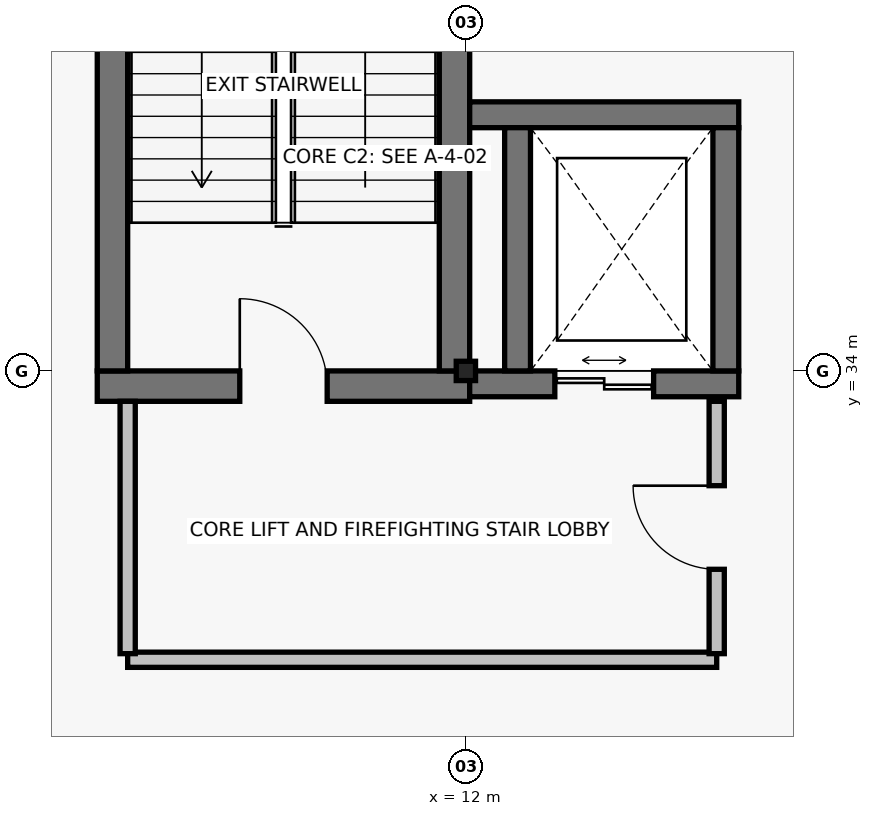
"""IFC4 building model, lengths in metres.
Left out: names, types, materials, properties, quantities, classifications, styles, units other than length and angle.
Written with IfcOpenShell. Run it as: python <this file> out.ifc"""

import sys

from ifc_helpers import new_model, si_unit, direction, frame, frame_2d, origin, origin_2d, place, context, subcontext, project, spatial, rectangle, hollow_rectangle, extrude, element, fill, save


model = new_model("IFC4")
c1 = context("Model", 3, precision=1e-05, world=origin(), true_north=direction((0.0, 1.0)))
c2 = subcontext(c1, "Body", "Model", "MODEL_VIEW")
j1 = project(units=[si_unit("LENGTHUNIT", "METRE"), si_unit("PLANEANGLEUNIT", "RADIAN")], contexts=[c1])
p1 = place(None, origin())
s1 = spatial("IfcSite", under=j1, at=p1, CompositionType="ELEMENT")
p2 = place(p1, origin())
s2 = spatial("IfcBuilding", under=s1, at=p2, CompositionType="ELEMENT")
p3 = place(p2, frame((0.0, 0.0, 11.4)))
s3 = spatial("IfcBuildingStorey", under=s2, at=p3, CompositionType="ELEMENT", Elevation=11.4)
p4 = place(p3, frame((12.0, 34.0, 0.0), z_axis=(0.0, 0.0, 1.0), x_axis=(1.0, 0.0, 0.0)))
e1 = element("IfcColumn", 1, at=p4, inside=s3, PredefinedType="COLUMN", context=c2, shape_type="SweptSolid", body=[
    extrude(hollow_rectangle(XDim=0.254, YDim=0.254, WallThickness=0.01, InnerFilletRadius=0.01, OuterFilletRadius=0.019, at=origin_2d()), origin(), (0.0, 0.0, 1.0), 4.0),
])
p5 = place(p3, frame((7.15, 33.8, 0.0), z_axis=(0.0, 0.0, 1.0), x_axis=(1.0, 0.0, 0.0)))
e2 = element("IfcWall", 2, at=p5, inside=s3, PredefinedType="SHEAR", context=c2, shape_type="SweptSolid", body=[
    extrude(rectangle(XDim=4.9, YDim=0.4, at=frame_2d((2.45, 0.0))), origin(), (0.0, 0.0, 1.0), 3.76),
])
p6 = place(p5, frame((1.875, 0.0, 0.0)))
e3 = element("IfcOpeningElement", 3, at=p6, cuts=e2, PredefinedType="OPENING", context=c2, shape_type="SweptSolid", body=[
    extrude(rectangle(XDim=1.15, YDim=2.15, at=frame_2d((0.575, 1.075))), frame((0.0, 0.215, 0.0), z_axis=(0.0, -1.0, 0.0), x_axis=(1.0, 0.0, 0.0)), (0.0, 0.0, 1.0), 0.43),
])
for number, where, z_axis, x_axis in (
    (4, (7.35, 43.4, 0.0), (0.0, 0.0, 1.0), (0.0, -1.0, 0.0)),
    (5, (11.85, 34.0, 0.0), (0.0, 0.0, 1.0), (0.0, 1.0, 0.0)),
):
    element("IfcWall", number, at=place(p3, frame(where, z_axis=z_axis, x_axis=x_axis)), inside=s3, PredefinedType="SHEAR", context=c2, shape_type="SweptSolid", body=[
        extrude(rectangle(XDim=9.4, YDim=0.4, at=frame_2d((4.7, 0.0))), origin(), (0.0, 0.0, 1.0), 3.76),
    ])
p7 = place(p3, frame((12.05, 33.83, 0.0), z_axis=(0.0, 0.0, 1.0), x_axis=(1.0, 0.0, 0.0)))
e6 = element("IfcWall", 6, at=p7, inside=s3, PredefinedType="SHEAR", context=c2, shape_type="SweptSolid", body=[
    extrude(rectangle(XDim=3.54, YDim=0.34, at=frame_2d((1.77, 0.0))), origin(), (0.0, 0.0, 1.0), 3.76),
])
p8 = place(p7, frame((1.12, 0.0, 0.0)))
e7 = element("IfcOpeningElement", 7, at=p8, cuts=e6, PredefinedType="OPENING", context=c2, shape_type="SweptSolid", body=[
    extrude(rectangle(XDim=1.3, YDim=2.25, at=frame_2d((0.65, 1.125))), frame((0.0, 0.185, 0.0), z_axis=(0.0, -1.0, 0.0), x_axis=(1.0, 0.0, 0.0)), (0.0, 0.0, 1.0), 0.37),
])
p9 = place(p3, frame((15.59, 37.37, 0.0), z_axis=(0.0, 0.0, 1.0), x_axis=(-1.0, 0.0, 0.0)))
e8 = element("IfcWall", 8, at=p9, inside=s3, PredefinedType="SHEAR", context=c2, shape_type="SweptSolid", body=[
    extrude(rectangle(XDim=3.54, YDim=0.34, at=frame_2d((1.77, 0.0))), origin(), (0.0, 0.0, 1.0), 3.76),
])
for number, where, z_axis, x_axis in (
    (9, (12.68, 37.2, 0.0), (0.0, 0.0, 1.0), (0.0, -1.0, 0.0)),
    (10, (15.42, 34.0, 0.0), (0.0, 0.0, 1.0), (0.0, 1.0, 0.0)),
):
    element("IfcWall", number, at=place(p3, frame(where, z_axis=z_axis, x_axis=x_axis)), inside=s3, PredefinedType="SHEAR", context=c2, shape_type="SweptSolid", body=[
        extrude(rectangle(XDim=3.2, YDim=0.34, at=frame_2d((1.6, 0.0))), origin(), (0.0, 0.0, 1.0), 3.76),
    ])
p10 = place(p3, frame((7.55, 30.2, 0.0), z_axis=(0.0, 0.0, 1.0), x_axis=(1.0, 0.0, 0.0)))
e11 = element("IfcWall", 11, at=p10, inside=s3, PredefinedType="PARTITIONING", context=c2, shape_type="SweptSolid", body=[
    extrude(rectangle(XDim=7.75, YDim=0.2, at=frame_2d((3.875, 0.0))), origin(), (0.0, 0.0, 1.0), 3.187),
])
p11 = place(p3, frame((7.55, 33.6, 0.0), z_axis=(0.0, 0.0, 1.0), x_axis=(0.0, -1.0, 0.0)))
e12 = element("IfcWall", 12, at=p11, inside=s3, PredefinedType="PARTITIONING", context=c2, shape_type="SweptSolid", body=[
    extrude(rectangle(XDim=3.32, YDim=0.2, at=frame_2d((1.66, 0.0))), origin(), (0.0, 0.0, 1.0), 3.68),
])
p12 = place(p3, frame((15.3, 30.28, 0.0), z_axis=(0.0, 0.0, 1.0), x_axis=(0.0, 1.0, 0.0)))
e13 = element("IfcWall", 13, at=p12, inside=s3, PredefinedType="PARTITIONING", context=c2, shape_type="SweptSolid", body=[
    extrude(rectangle(XDim=3.32, YDim=0.2, at=frame_2d((1.66, 0.0))), origin(), (0.0, 0.0, 1.0), 3.68),
])
p13 = place(p12, frame((1.11, 0.0, 0.0)))
e14 = element("IfcOpeningElement", 14, at=p13, cuts=e13, PredefinedType="OPENING", context=c2, shape_type="SweptSolid", body=[
    extrude(rectangle(XDim=1.1, YDim=2.15, at=frame_2d((0.55, 1.075))), frame((0.0, 0.115, 0.0), z_axis=(0.0, -1.0, 0.0), x_axis=(1.0, 0.0, 0.0)), (0.0, 0.0, 1.0), 0.23),
])
p14 = place(p6, origin())
e15 = element("IfcDoor", 15, at=p14, inside=s3, OperationType="SINGLE_SWING_LEFT", PredefinedType="DOOR", context=c2, shape_type="SweptSolid", body=[
    extrude(rectangle(XDim=1.15, YDim=2.15, at=frame_2d((0.575, 1.075))), frame((0.0, 0.025, 0.0), z_axis=(0.0, -1.0, 0.0), x_axis=(1.0, 0.0, 0.0)), (0.0, 0.0, 1.0), 0.05),
])
fill(e3, e15)
p15 = place(p8, origin())
e16 = element("IfcDoor", 16, at=p15, inside=s3, OperationType="DOUBLE_DOOR_SLIDING", PredefinedType="DOOR", context=c2, shape_type="SweptSolid", body=[
    extrude(rectangle(XDim=1.3, YDim=2.25, at=frame_2d((0.65, 1.125))), frame((0.0, 0.025, 0.0), z_axis=(0.0, -1.0, 0.0), x_axis=(1.0, 0.0, 0.0)), (0.0, 0.0, 1.0), 0.05),
])
fill(e7, e16)
p16 = place(p13, origin())
e17 = element("IfcDoor", 17, at=p16, inside=s3, OperationType="SINGLE_SWING_RIGHT", PredefinedType="DOOR", context=c2, shape_type="SweptSolid", body=[
    extrude(rectangle(XDim=1.1, YDim=2.15, at=frame_2d((0.55, 1.075))), frame((0.0, 0.025, 0.0), z_axis=(0.0, -1.0, 0.0), x_axis=(1.0, 0.0, 0.0)), (0.0, 0.0, 1.0), 0.05),
])
fill(e14, e17)
save(model, sys.argv[1])
